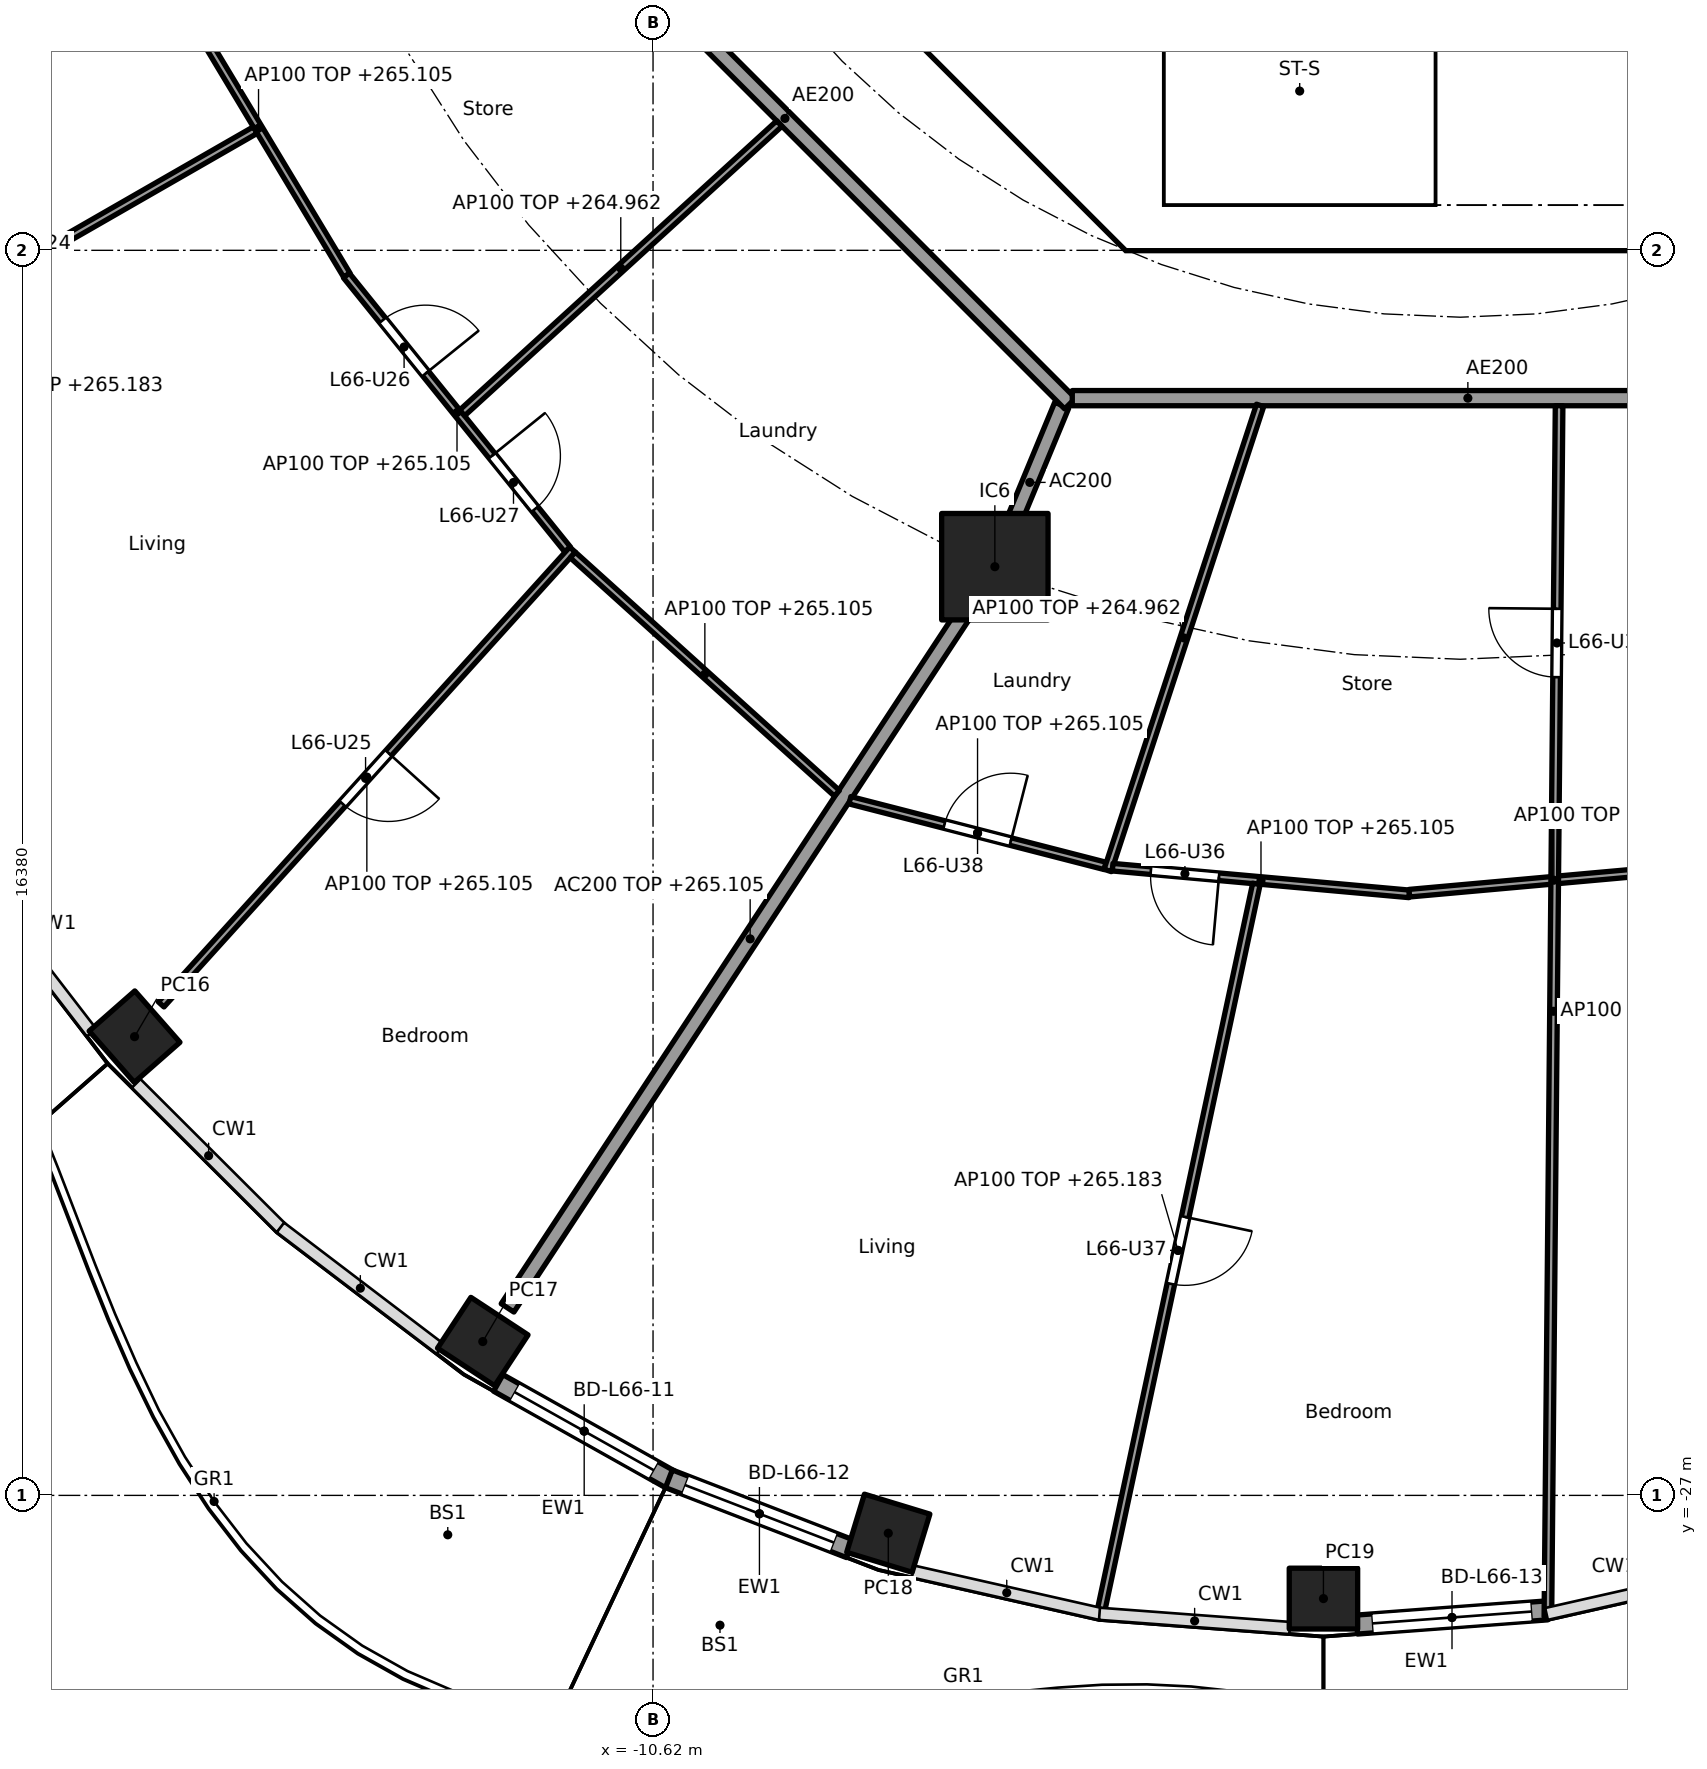
"""IFC4 building model, lengths in metres.
Left out: names, types, materials, properties, quantities, classifications, styles, units other than length and angle.
Written with IfcOpenShell. Run it as: python <this file> out.ifc"""

import sys

from ifc_helpers import new_model, si_unit, direction, frame, frame_2d, origin, origin_2d, place, context, subcontext, project, spatial, polyline, rectangle, hollow_rectangle, outline, extrude, element, fill, save


model = new_model("IFC4")
c1 = context("Model", 3, precision=1e-05, world=origin(), true_north=direction((0.0, 1.0)))
c2 = subcontext(c1, "Body", "Model", "MODEL_VIEW")
j1 = project(units=[si_unit("LENGTHUNIT", "METRE"), si_unit("PLANEANGLEUNIT", "RADIAN")], contexts=[c1])
p1 = place(None, origin())
s1 = spatial("IfcSite", under=j1, at=p1, CompositionType="ELEMENT")
p2 = place(p1, origin())
s2 = spatial("IfcBuilding", under=s1, at=p2, CompositionType="ELEMENT")
p3 = place(p2, frame((0.0, 0.0, 262.2)))
s3 = spatial("IfcBuildingStorey", under=s2, at=p3, CompositionType="ELEMENT", Elevation=262.2)
for number, where, z_axis, x_axis in (
    (1, (-17.441, -20.965, 0.0), (0.0, 0.0, 1.0), (0.66, -0.751, 0.0)),
    (2, (-12.86, -24.976, 0.0), (0.0, 0.0, 1.0), (0.836, -0.549, 0.0)),
    (3, (-7.525, -27.498, 0.0), (0.0, 0.0, 1.0), (0.957, -0.292, 0.0)),
    (4, (-1.8, -28.358, 0.0), (0.0, 0.0, 1.0), (1.0, 0.0, 0.0)),
):
    element("IfcColumn", number, at=place(p3, frame(where, z_axis=z_axis, x_axis=x_axis)), inside=s3, PredefinedType="COLUMN", context=c2, shape_type="SweptSolid", body=[
        extrude(hollow_rectangle(XDim=0.9, YDim=0.8, WallThickness=0.028, at=origin_2d()), origin(), (0.0, 0.0, 1.0), 3.7),
    ])
p4 = place(p3, frame((-6.123, -14.782, 0.0), z_axis=(0.0, 0.0, 1.0), x_axis=(1.0, 0.0, 0.0)))
e5 = element("IfcColumn", 5, at=p4, inside=s3, PredefinedType="COLUMN", context=c2, shape_type="SweptSolid", body=[
    extrude(rectangle(XDim=1.4, YDim=1.4, at=origin_2d()), origin(), (0.0, 0.0, 1.0), 3.7),
])
p5 = place(p3, frame((-10.395, -26.789, 0.0), z_axis=(0.0, 0.0, 1.0), x_axis=(-0.872115604046, 0.489299880625, 0.0)))
e6 = element("IfcWall", 6, at=p5, inside=s3, PredefinedType="SOLIDWALL", context=c2, shape_type="SweptSolid", body=[
    extrude(rectangle(XDim=2.593, YDim=0.25, at=frame_2d((1.296, 0.0))), origin(), (0.0, 0.0, 1.0), 3.44),
])
p6 = place(p5, frame((0.247, 0.0, 0.0)))
e7 = element("IfcOpeningElement", 7, at=p6, cuts=e6, PredefinedType="OPENING", context=c2, shape_type="SweptSolid", body=[
    extrude(rectangle(XDim=2.1, YDim=2.4, at=frame_2d((1.05, 1.2))), frame((0.0, 0.135, 0.0), z_axis=(0.0, -1.0, 0.0), x_axis=(1.0, 0.0, 0.0)), (0.0, 0.0, 1.0), 0.27),
])
p7 = place(p3, frame((-8.029, -27.702, 0.0), z_axis=(0.0, 0.0, 1.0), x_axis=(-0.93282223778, 0.360336887792, 0.0)))
e8 = element("IfcWall", 8, at=p7, inside=s3, PredefinedType="SOLIDWALL", context=c2, shape_type="SweptSolid", body=[
    extrude(rectangle(XDim=2.554, YDim=0.25, at=frame_2d((1.277, 0.0))), origin(), (0.0, 0.0, 1.0), 3.44),
])
p8 = place(p7, frame((0.227, 0.0, 0.0)))
e9 = element("IfcOpeningElement", 9, at=p8, cuts=e8, PredefinedType="OPENING", context=c2, shape_type="SweptSolid", body=[
    extrude(rectangle(XDim=2.1, YDim=2.4, at=frame_2d((1.05, 1.2))), frame((0.0, 0.135, 0.0), z_axis=(0.0, -1.0, 0.0), x_axis=(1.0, 0.0, 0.0)), (0.0, 0.0, 1.0), 0.27),
])
p9 = place(p3, frame((1.143, -28.513, 0.0), z_axis=(0.0, 0.0, 1.0), x_axis=(-0.997236892469, -0.074287147606, 0.0)))
e10 = element("IfcWall", 10, at=p9, inside=s3, PredefinedType="SOLIDWALL", context=c2, shape_type="SweptSolid", body=[
    extrude(rectangle(XDim=2.511, YDim=0.25, at=frame_2d((1.255, 0.0))), origin(), (0.0, 0.0, 1.0), 3.44),
])
p10 = place(p9, frame((0.205, 0.0, 0.0)))
e11 = element("IfcOpeningElement", 11, at=p10, cuts=e10, PredefinedType="OPENING", context=c2, shape_type="SweptSolid", body=[
    extrude(rectangle(XDim=2.1, YDim=2.4, at=frame_2d((1.05, 1.2))), frame((0.0, 0.135, 0.0), z_axis=(0.0, -1.0, 0.0), x_axis=(1.0, 0.0, 0.0)), (0.0, 0.0, 1.0), 0.27),
])
p11 = place(p3, frame((-9.988, -4.613, 0.0), z_axis=(0.0, 0.0, 1.0), x_axis=(0.707106781187, -0.707106781187, 0.0)))
e12 = element("IfcWall", 12, at=p11, inside=s3, PredefinedType="SHEAR", context=c2, shape_type="SweptSolid", body=[
    extrude(rectangle(XDim=7.602, YDim=0.6, at=frame_2d((3.801, 0.0))), origin(), (0.0, 0.0, 1.0), 3.44),
])
p12 = place(p11, frame((6.151, 0.0, 0.0)))
e13 = element("IfcOpeningElement", 13, at=p12, cuts=e12, PredefinedType="OPENING", context=c2, shape_type="SweptSolid", body=[
    extrude(rectangle(XDim=1.1, YDim=2.1, at=frame_2d((0.55, 1.05))), frame((0.0, 0.31, 0.0), z_axis=(0.0, -1.0, 0.0), x_axis=(1.0, 0.0, 0.0)), (0.0, 0.0, 1.0), 0.62),
])
p13 = place(p3, origin())
e14 = element("IfcWall", 14, at=p13, inside=s3, PredefinedType="SHEAR", context=c2, shape_type="SweptSolid", body=[
    extrude(outline(polyline([(-4.152, -10.025), (4.152, -10.025), (4.401, -9.776), (4.825, -10.2), (4.401, -10.625), (-4.401, -10.625), (-4.825, -10.2), (-4.401, -9.776), (-4.152, -10.025)])), origin(), (0.0, 0.0, 1.0), 3.44),
])
p14 = place(p3, origin())
e15 = element("IfcWall", 15, at=p14, inside=s3, PredefinedType="SOLIDWALL", context=c2, shape_type="SweptSolid", body=[
    extrude(outline(polyline([(-3.9, -10.025), (-4.1, -10.025), (-4.1, -7.025), (-3.9, -7.025), (-3.9, -10.025)])), origin(), (0.0, 0.0, 1.0), 3.44),
])
p15 = place(p3, frame((-5.243, -12.657, 0.0), z_axis=(0.0, 0.0, 1.0), x_axis=(-0.382770106157, -0.923843626288, 0.0)))
e16 = element("IfcWall", 16, at=p15, inside=s3, PredefinedType="PARTITIONING", context=c2, shape_type="SweptSolid", body=[
    extrude(rectangle(XDim=2.199, YDim=0.2, at=frame_2d((1.1, 0.0))), origin(), (0.0, 0.0, 1.0), 3.44),
])
p16 = place(p3, frame((-6.151, -14.824, 0.0), z_axis=(0.0, 0.0, 1.0), x_axis=(-0.549345577828, -0.835595258556, 0.0)))
e17 = element("IfcWall", 17, at=p16, inside=s3, PredefinedType="PARTITIONING", context=c2, shape_type="SweptSolid", body=[
    extrude(rectangle(XDim=11.62, YDim=0.2, at=frame_2d((5.81, 0.0))), origin(), (0.0, 0.0, 1.0), 2.905),
])
p17 = place(p3, frame((-12.635, -5.134, 0.0), z_axis=(0.0, 0.0, 1.0), x_axis=(0.707106781187, -0.707106781187, 0.0)))
e18 = element("IfcWall", 18, at=p17, inside=s3, PredefinedType="PARTITIONING", context=c2, shape_type="SweptSolid", body=[
    extrude(rectangle(XDim=10.609, YDim=0.2, at=frame_2d((5.305, 0.0))), origin(), (0.0, 0.0, 1.0), 3.44),
])
p18 = place(p3, frame((-5.104, -12.565, 0.0), z_axis=(0.0, 0.0, 1.0), x_axis=(1.0, 0.0, 0.0)))
e19 = element("IfcWall", 19, at=p18, inside=s3, PredefinedType="PARTITIONING", context=c2, shape_type="SweptSolid", body=[
    extrude(rectangle(XDim=10.409, YDim=0.2, at=frame_2d((5.205, 0.0))), origin(), (0.0, 0.0, 1.0), 3.44),
])
p19 = place(p3, frame((-16.972, -7.08, 0.0), z_axis=(0.0, 0.0, 1.0), x_axis=(0.514989049311, -0.857196756346, 0.0)))
e20 = element("IfcWall", 20, at=p19, inside=s3, PredefinedType="PARTITIONING", context=c2, shape_type="SweptSolid", body=[
    extrude(rectangle(XDim=4.512, YDim=0.1, at=frame_2d((2.256, 0.0))), origin(), (0.0, 0.0, 1.0), 2.905),
])
p20 = place(p3, frame((-15.854, -9.038, 0.0), z_axis=(0.0, 0.0, 1.0), x_axis=(-0.867229230904, -0.497909089157, 0.0)))
e21 = element("IfcWall", 21, at=p20, inside=s3, PredefinedType="PARTITIONING", context=c2, shape_type="SweptSolid", body=[
    extrude(rectangle(XDim=7.853, YDim=0.1, at=frame_2d((3.926, 0.0))), origin(), (0.0, 0.0, 1.0), 2.983),
])
p21 = place(p20, frame((3.476, 0.0, 0.0)))
e22 = element("IfcOpeningElement", 22, at=p21, cuts=e21, PredefinedType="OPENING", context=c2, shape_type="SweptSolid", body=[
    extrude(rectangle(XDim=0.9, YDim=2.1, at=frame_2d((0.45, 1.05))), frame((0.0, 0.06, 0.0), z_axis=(0.0, -1.0, 0.0), x_axis=(1.0, 0.0, 0.0)), (0.0, 0.0, 1.0), 0.12),
])
p22 = place(p3, frame((-14.654, -10.951, 0.0), z_axis=(0.0, 0.0, 1.0), x_axis=(0.62815308134, -0.778089780426, 0.0)))
e23 = element("IfcWall", 23, at=p22, inside=s3, PredefinedType="PARTITIONING", context=c2, shape_type="SweptSolid", body=[
    extrude(rectangle(XDim=4.633, YDim=0.1, at=frame_2d((2.316, 0.0))), origin(), (0.0, 0.0, 1.0), 2.905),
])
p23 = place(p22, frame((0.758, 0.0, 0.0)))
e24 = element("IfcOpeningElement", 24, at=p23, cuts=e23, PredefinedType="OPENING", context=c2, shape_type="SweptSolid", body=[
    extrude(rectangle(XDim=0.9, YDim=2.1, at=frame_2d((0.45, 1.05))), frame((0.0, 0.06, 0.0), z_axis=(0.0, -1.0, 0.0), x_axis=(1.0, 0.0, 0.0)), (0.0, 0.0, 1.0), 0.12),
])
p24 = place(p22, frame((3.049, 0.0, 0.0)))
e25 = element("IfcOpeningElement", 25, at=p24, cuts=e23, PredefinedType="OPENING", context=c2, shape_type="SweptSolid", body=[
    extrude(rectangle(XDim=0.9, YDim=2.1, at=frame_2d((0.45, 1.05))), frame((0.0, 0.06, 0.0), z_axis=(0.0, -1.0, 0.0), x_axis=(1.0, 0.0, 0.0)), (0.0, 0.0, 1.0), 0.12),
])
p25 = place(p3, frame((-8.958, -8.952, 0.0), z_axis=(0.0, 0.0, 1.0), x_axis=(-0.73876526954, -0.673962815385, 0.0)))
e26 = element("IfcWall", 26, at=p25, inside=s3, PredefinedType="PARTITIONING", context=c2, shape_type="SweptSolid", body=[
    extrude(rectangle(XDim=5.647, YDim=0.1, at=frame_2d((2.824, 0.0))), origin(), (0.0, 0.0, 1.0), 2.762),
])
p26 = place(p3, frame((-11.679, -14.557, 0.0), z_axis=(0.0, 0.0, 1.0), x_axis=(-0.670800011545, -0.741638284146, 0.0)))
e27 = element("IfcWall", 27, at=p26, inside=s3, PredefinedType="PARTITIONING", context=c2, shape_type="SweptSolid", body=[
    extrude(rectangle(XDim=8.068, YDim=0.1, at=frame_2d((4.034, 0.0))), origin(), (0.0, 0.0, 1.0), 2.905),
])
p27 = place(p26, frame((3.609, 0.0, 0.0)))
e28 = element("IfcOpeningElement", 28, at=p27, cuts=e27, PredefinedType="OPENING", context=c2, shape_type="SweptSolid", body=[
    extrude(rectangle(XDim=0.9, YDim=2.1, at=frame_2d((0.45, 1.05))), frame((0.0, 0.06, 0.0), z_axis=(0.0, -1.0, 0.0), x_axis=(1.0, 0.0, 0.0)), (0.0, 0.0, 1.0), 0.12),
])
p28 = place(p3, frame((-11.676, -14.628, 0.0), z_axis=(0.0, 0.0, 1.0), x_axis=(0.74245829867, -0.669892285921, 0.0)))
e29 = element("IfcWall", 29, at=p28, inside=s3, PredefinedType="PARTITIONING", context=c2, shape_type="SweptSolid", body=[
    extrude(rectangle(XDim=4.68, YDim=0.1, at=frame_2d((2.34, 0.0))), origin(), (0.0, 0.0, 1.0), 2.905),
])
p29 = place(p3, frame((-8.03, -17.854, 0.0), z_axis=(0.0, 0.0, 1.0), x_axis=(0.968441967324, -0.249239154077, 0.0)))
e30 = element("IfcWall", 30, at=p29, inside=s3, PredefinedType="PARTITIONING", context=c2, shape_type="SweptSolid", body=[
    extrude(rectangle(XDim=3.468, YDim=0.1, at=frame_2d((1.734, 0.0))), origin(), (0.0, 0.0, 1.0), 2.905),
])
p30 = place(p29, frame((1.284, 0.0, 0.0)))
e31 = element("IfcOpeningElement", 31, at=p30, cuts=e30, PredefinedType="OPENING", context=c2, shape_type="SweptSolid", body=[
    extrude(rectangle(XDim=0.9, YDim=2.1, at=frame_2d((0.45, 1.05))), frame((0.0, 0.06, 0.0), z_axis=(0.0, -1.0, 0.0), x_axis=(1.0, 0.0, 0.0)), (0.0, 0.0, 1.0), 0.12),
])
p31 = place(p3, frame((-2.633, -12.66, 0.0), z_axis=(0.0, 0.0, 1.0), x_axis=(-0.311435053715, -0.950267439891, 0.0)))
e32 = element("IfcWall", 32, at=p31, inside=s3, PredefinedType="PARTITIONING", context=c2, shape_type="SweptSolid", body=[
    extrude(rectangle(XDim=6.439, YDim=0.1, at=frame_2d((3.22, 0.0))), origin(), (0.0, 0.0, 1.0), 2.762),
])
p32 = place(p3, frame((-4.573, -18.736, 0.0), z_axis=(0.0, 0.0, 1.0), x_axis=(0.995984610732, -0.089524606594, 0.0)))
e33 = element("IfcWall", 33, at=p32, inside=s3, PredefinedType="PARTITIONING", context=c2, shape_type="SweptSolid", body=[
    extrude(rectangle(XDim=3.919, YDim=0.1, at=frame_2d((1.959, 0.0))), origin(), (0.0, 0.0, 1.0), 2.905),
])
p33 = place(p32, frame((0.505, 0.0, 0.0)))
e34 = element("IfcOpeningElement", 34, at=p33, cuts=e33, PredefinedType="OPENING", context=c2, shape_type="SweptSolid", body=[
    extrude(rectangle(XDim=0.9, YDim=2.1, at=frame_2d((0.45, 1.05))), frame((0.0, 0.06, 0.0), z_axis=(0.0, -1.0, 0.0), x_axis=(1.0, 0.0, 0.0)), (0.0, 0.0, 1.0), 0.12),
])
p34 = place(p3, frame((-2.682, -18.955, 0.0), z_axis=(0.0, 0.0, 1.0), x_axis=(-0.209106370979, -0.977892900892, 0.0)))
e35 = element("IfcWall", 35, at=p34, inside=s3, PredefinedType="PARTITIONING", context=c2, shape_type="SweptSolid", body=[
    extrude(rectangle(XDim=9.861, YDim=0.1, at=frame_2d((4.931, 0.0))), origin(), (0.0, 0.0, 1.0), 2.983),
])
p35 = place(p34, frame((4.48, 0.0, 0.0)))
e36 = element("IfcOpeningElement", 36, at=p35, cuts=e35, PredefinedType="OPENING", context=c2, shape_type="SweptSolid", body=[
    extrude(rectangle(XDim=0.9, YDim=2.1, at=frame_2d((0.45, 1.05))), frame((0.0, 0.06, 0.0), z_axis=(0.0, -1.0, 0.0), x_axis=(1.0, 0.0, 0.0)), (0.0, 0.0, 1.0), 0.12),
])
p36 = place(p3, frame((-0.67, -19.077, 0.0), z_axis=(0.0, 0.0, 1.0), x_axis=(0.995986472869, 0.089503887414, 0.0)))
e37 = element("IfcWall", 37, at=p36, inside=s3, PredefinedType="PARTITIONING", context=c2, shape_type="SweptSolid", body=[
    extrude(rectangle(XDim=3.819, YDim=0.1, at=frame_2d((1.909, 0.0))), origin(), (0.0, 0.0, 1.0), 2.905),
])
p37 = place(p3, frame((1.3, -12.665, 0.0), z_axis=(0.0, 0.0, 1.0), x_axis=(-0.009254890166, -0.999957172587, 0.0)))
e38 = element("IfcWall", 38, at=p37, inside=s3, PredefinedType="PARTITIONING", context=c2, shape_type="SweptSolid", body=[
    extrude(rectangle(XDim=15.933, YDim=0.1, at=frame_2d((7.967, 0.0))), origin(), (0.0, 0.0, 1.0), 2.762),
])
p38 = place(p37, frame((2.671, 0.0, 0.0)))
e39 = element("IfcOpeningElement", 39, at=p38, cuts=e38, PredefinedType="OPENING", context=c2, shape_type="SweptSolid", body=[
    extrude(rectangle(XDim=0.9, YDim=2.1, at=frame_2d((0.45, 1.05))), frame((0.0, 0.06, 0.0), z_axis=(0.0, -1.0, 0.0), x_axis=(1.0, 0.0, 0.0)), (0.0, 0.0, 1.0), 0.12),
])
p39 = place(p6, origin())
e40 = element("IfcDoor", 40, at=p39, inside=s3, OperationType="SLIDING_TO_LEFT", PredefinedType="DOOR", context=c2, shape_type="SweptSolid", body=[
    extrude(rectangle(XDim=2.1, YDim=2.4, at=frame_2d((1.05, 1.2))), frame((0.0, 0.025, 0.0), z_axis=(0.0, -1.0, 0.0), x_axis=(1.0, 0.0, 0.0)), (0.0, 0.0, 1.0), 0.05),
])
fill(e7, e40)
p40 = place(p8, origin())
e41 = element("IfcDoor", 41, at=p40, inside=s3, OperationType="SLIDING_TO_LEFT", PredefinedType="DOOR", context=c2, shape_type="SweptSolid", body=[
    extrude(rectangle(XDim=2.1, YDim=2.4, at=frame_2d((1.05, 1.2))), frame((0.0, 0.025, 0.0), z_axis=(0.0, -1.0, 0.0), x_axis=(1.0, 0.0, 0.0)), (0.0, 0.0, 1.0), 0.05),
])
fill(e9, e41)
p41 = place(p10, origin())
e42 = element("IfcDoor", 42, at=p41, inside=s3, OperationType="SLIDING_TO_LEFT", PredefinedType="DOOR", context=c2, shape_type="SweptSolid", body=[
    extrude(rectangle(XDim=2.1, YDim=2.4, at=frame_2d((1.05, 1.2))), frame((0.0, 0.025, 0.0), z_axis=(0.0, -1.0, 0.0), x_axis=(1.0, 0.0, 0.0)), (0.0, 0.0, 1.0), 0.05),
])
fill(e11, e42)
p42 = place(p12, origin())
e43 = element("IfcDoor", 43, at=p42, inside=s3, OperationType="SINGLE_SWING_RIGHT", PredefinedType="DOOR", context=c2, shape_type="SweptSolid", body=[
    extrude(rectangle(XDim=1.1, YDim=2.1, at=frame_2d((0.55, 1.05))), frame((0.0, 0.025, 0.0), z_axis=(0.0, -1.0, 0.0), x_axis=(1.0, 0.0, 0.0)), (0.0, 0.0, 1.0), 0.05),
])
fill(e13, e43)
p43 = place(p27, origin())
e44 = element("IfcDoor", 44, at=p43, inside=s3, OperationType="SINGLE_SWING_LEFT", PredefinedType="DOOR", context=c2, shape_type="SweptSolid", body=[
    extrude(rectangle(XDim=0.9, YDim=2.1, at=frame_2d((0.45, 1.05))), frame((0.0, 0.025, 0.0), z_axis=(0.0, -1.0, 0.0), x_axis=(1.0, 0.0, 0.0)), (0.0, 0.0, 1.0), 0.05),
])
fill(e28, e44)
p44 = place(p23, origin())
e45 = element("IfcDoor", 45, at=p44, inside=s3, OperationType="SINGLE_SWING_RIGHT", PredefinedType="DOOR", context=c2, shape_type="SweptSolid", body=[
    extrude(rectangle(XDim=0.9, YDim=2.1, at=frame_2d((0.45, 1.05))), frame((0.0, 0.025, 0.0), z_axis=(0.0, -1.0, 0.0), x_axis=(1.0, 0.0, 0.0)), (0.0, 0.0, 1.0), 0.05),
])
fill(e24, e45)
p45 = place(p24, origin())
e46 = element("IfcDoor", 46, at=p45, inside=s3, OperationType="SINGLE_SWING_LEFT", PredefinedType="DOOR", context=c2, shape_type="SweptSolid", body=[
    extrude(rectangle(XDim=0.9, YDim=2.1, at=frame_2d((0.45, 1.05))), frame((0.0, 0.025, 0.0), z_axis=(0.0, -1.0, 0.0), x_axis=(1.0, 0.0, 0.0)), (0.0, 0.0, 1.0), 0.05),
])
fill(e25, e46)
p46 = place(p38, frame((0.9, 0.0, 0.0), x_axis=(-1.0, 0.0, 0.0)))
e47 = element("IfcDoor", 47, at=p46, inside=s3, OperationType="SINGLE_SWING_RIGHT", PredefinedType="DOOR", context=c2, shape_type="SweptSolid", body=[
    extrude(rectangle(XDim=0.9, YDim=2.1, at=frame_2d((0.45, 1.05))), frame((0.0, 0.025, 0.0), z_axis=(0.0, -1.0, 0.0), x_axis=(1.0, 0.0, 0.0)), (0.0, 0.0, 1.0), 0.05),
])
fill(e39, e47)
p47 = place(p33, frame((0.9, 0.0, 0.0), x_axis=(-1.0, 0.0, 0.0)))
e48 = element("IfcDoor", 48, at=p47, inside=s3, OperationType="SINGLE_SWING_LEFT", PredefinedType="DOOR", context=c2, shape_type="SweptSolid", body=[
    extrude(rectangle(XDim=0.9, YDim=2.1, at=frame_2d((0.45, 1.05))), frame((0.0, 0.025, 0.0), z_axis=(0.0, -1.0, 0.0), x_axis=(1.0, 0.0, 0.0)), (0.0, 0.0, 1.0), 0.05),
])
fill(e34, e48)
p48 = place(p35, origin())
e49 = element("IfcDoor", 49, at=p48, inside=s3, OperationType="SINGLE_SWING_LEFT", PredefinedType="DOOR", context=c2, shape_type="SweptSolid", body=[
    extrude(rectangle(XDim=0.9, YDim=2.1, at=frame_2d((0.45, 1.05))), frame((0.0, 0.025, 0.0), z_axis=(0.0, -1.0, 0.0), x_axis=(1.0, 0.0, 0.0)), (0.0, 0.0, 1.0), 0.05),
])
fill(e36, e49)
p49 = place(p30, origin())
e50 = element("IfcDoor", 50, at=p49, inside=s3, OperationType="SINGLE_SWING_RIGHT", PredefinedType="DOOR", context=c2, shape_type="SweptSolid", body=[
    extrude(rectangle(XDim=0.9, YDim=2.1, at=frame_2d((0.45, 1.05))), frame((0.0, 0.025, 0.0), z_axis=(0.0, -1.0, 0.0), x_axis=(1.0, 0.0, 0.0)), (0.0, 0.0, 1.0), 0.05),
])
fill(e31, e50)
save(model, sys.argv[1])
